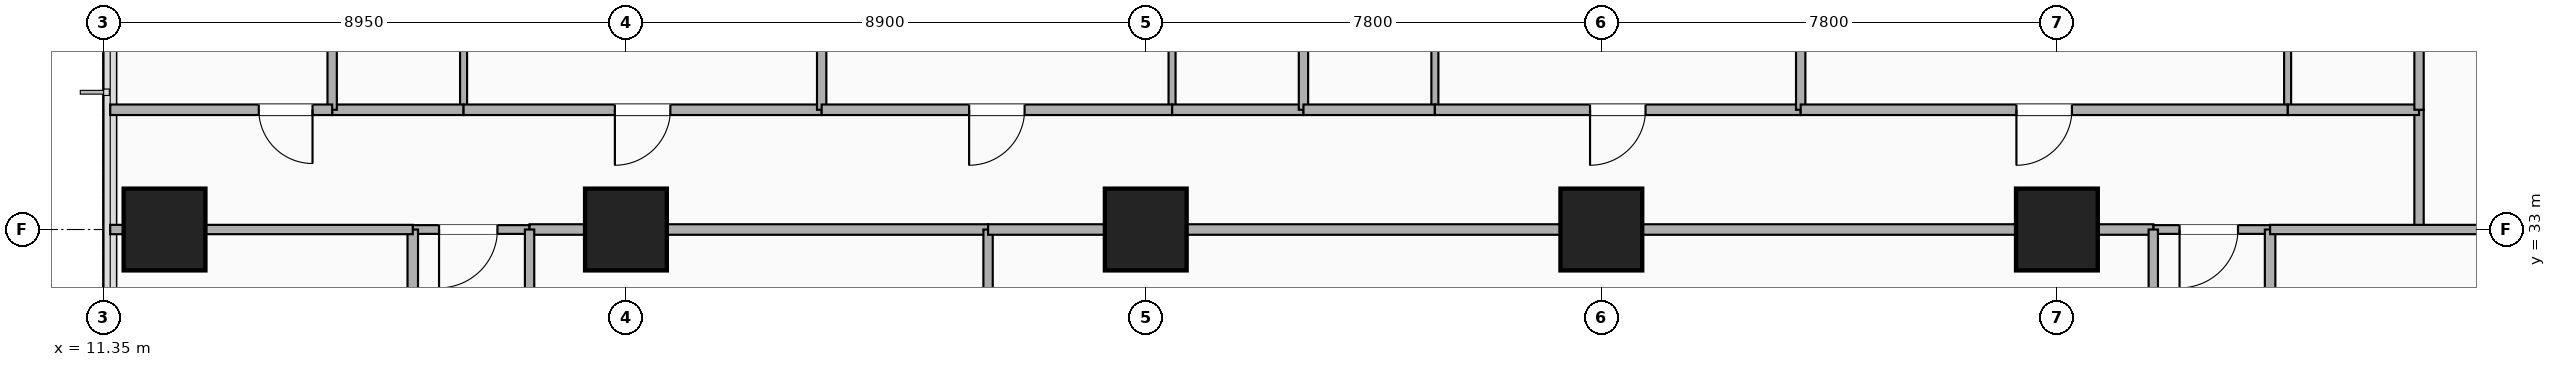
"""IFC4 building model, lengths in metres.
Left out: names, types, materials, properties, quantities, classifications, styles, units other than length and angle.
Written with IfcOpenShell. Run it as: python <this file> out.ifc"""

import sys

from ifc_helpers import new_model, si_unit, direction, frame, frame_2d, origin, origin_2d, place, context, subcontext, project, spatial, rectangle, extrude, element, fill, save


model = new_model("IFC4")
c1 = context("Model", 3, precision=1e-05, world=origin(), true_north=direction((0.0, 1.0)))
c2 = subcontext(c1, "Body", "Model", "MODEL_VIEW")
j1 = project(units=[si_unit("LENGTHUNIT", "METRE"), si_unit("PLANEANGLEUNIT", "RADIAN")], contexts=[c1])
p1 = place(None, origin())
s1 = spatial("IfcSite", under=j1, at=p1, CompositionType="ELEMENT")
p2 = place(p1, origin())
s2 = spatial("IfcBuilding", under=s1, at=p2, CompositionType="ELEMENT")
p3 = place(p2, frame((0.0, 0.0, 71.9)))
s3 = spatial("IfcBuildingStorey", under=s2, at=p3, CompositionType="ELEMENT", Elevation=71.9)
for number, where, z_axis, x_axis in (
    (1, (20.3, 33.0, -0.28), (0.0, 0.0, 1.0), (1.0, 0.0, 0.0)),
    (2, (29.2, 33.0, -0.28), (0.0, 0.0, 1.0), (1.0, 0.0, 0.0)),
    (3, (37.0, 33.0, -0.28), (0.0, 0.0, 1.0), (1.0, 0.0, 0.0)),
    (4, (44.8, 33.0, -0.28), (0.0, 0.0, 1.0), (1.0, 0.0, 0.0)),
    (5, (12.4, 33.0, -0.28), (0.0, 0.0, 1.0), (1.0, 0.0, 0.0)),
):
    element("IfcColumn", number, at=place(p3, frame(where, z_axis=z_axis, x_axis=x_axis)), inside=s3, PredefinedType="COLUMN", context=c2, shape_type="SweptSolid", body=[
        extrude(rectangle(XDim=1.4, YDim=1.4, at=origin_2d()), origin(), (0.0, 0.0, 1.0), 3.46),
    ])
p4 = place(p3, frame((16.65, 33.0, 0.0), z_axis=(0.0, 0.0, 1.0), x_axis=(1.0, 0.0, 0.0)))
e6 = element("IfcWall", 6, at=p4, inside=s3, PredefinedType="PARTITIONING", context=c2, shape_type="SweptSolid", body=[
    extrude(rectangle(XDim=2.0, YDim=0.15, at=frame_2d((1.0, 0.0))), origin(), (0.0, 0.0, 1.0), 2.47),
])
p5 = place(p4, frame((0.45, 0.0, 0.0)))
e7 = element("IfcOpeningElement", 7, at=p5, cuts=e6, PredefinedType="OPENING", context=c2, shape_type="SweptSolid", body=[
    extrude(rectangle(XDim=1.0, YDim=2.15, at=frame_2d((0.5, 1.075))), frame((0.0, 0.085, 0.0), z_axis=(0.0, -1.0, 0.0), x_axis=(1.0, 0.0, 0.0)), (0.0, 0.0, 1.0), 0.17),
])
p6 = place(p3, frame((46.45, 33.0, 0.0), z_axis=(0.0, 0.0, 1.0), x_axis=(1.0, 0.0, 0.0)))
e8 = element("IfcWall", 8, at=p6, inside=s3, PredefinedType="PARTITIONING", context=c2, shape_type="SweptSolid", body=[
    extrude(rectangle(XDim=2.0, YDim=0.15, at=frame_2d((1.0, 0.0))), origin(), (0.0, 0.0, 1.0), 2.47),
])
p7 = place(p6, frame((0.45, 0.0, 0.0)))
e9 = element("IfcOpeningElement", 9, at=p7, cuts=e8, PredefinedType="OPENING", context=c2, shape_type="SweptSolid", body=[
    extrude(rectangle(XDim=1.0, YDim=2.15, at=frame_2d((0.5, 1.075))), frame((0.0, 0.085, 0.0), z_axis=(0.0, -1.0, 0.0), x_axis=(1.0, 0.0, 0.0)), (0.0, 0.0, 1.0), 0.17),
])
p8 = place(p3, frame((51.0, 33.0, 0.0), z_axis=(0.0, 0.0, 1.0), x_axis=(0.0, 1.0, 0.0)))
e10 = element("IfcWall", 10, at=p8, inside=s3, PredefinedType="PARTITIONING", context=c2, shape_type="SweptSolid", body=[
    extrude(rectangle(XDim=2.05, YDim=0.16, at=frame_2d((1.025, 0.0))), origin(), (0.0, 0.0, 1.0), 2.47),
])
p9 = place(p3, frame((18.65, 33.0, 0.0), z_axis=(0.0, 0.0, 1.0), x_axis=(1.0, 0.0, 0.0)))
e11 = element("IfcWall", 11, at=p9, inside=s3, PredefinedType="PARTITIONING", context=c2, shape_type="SweptSolid", body=[
    extrude(rectangle(XDim=7.85, YDim=0.18, at=frame_2d((3.925, 0.0))), origin(), (0.0, 0.0, 1.0), 2.47),
])
for number, where, z_axis, x_axis in (
    (12, (18.65, 22.65, 0.0), (0.0, 0.0, 1.0), (0.0, 1.0, 0.0)),
    (13, (26.5, 22.65, 0.0), (0.0, 0.0, 1.0), (0.0, 1.0, 0.0)),
):
    element("IfcWall", number, at=place(p3, frame(where, z_axis=z_axis, x_axis=x_axis)), inside=s3, PredefinedType="PARTITIONING", context=c2, shape_type="SweptSolid", body=[
        extrude(rectangle(XDim=10.35, YDim=0.16, at=frame_2d((5.175, 0.0))), origin(), (0.0, 0.0, 1.0), 2.47),
    ])
p10 = place(p3, frame((26.5, 33.0, 0.0), z_axis=(0.0, 0.0, 1.0), x_axis=(1.0, 0.0, 0.0)))
e14 = element("IfcWall", 14, at=p10, inside=s3, PredefinedType="PARTITIONING", context=c2, shape_type="SweptSolid", body=[
    extrude(rectangle(XDim=19.95, YDim=0.18, at=frame_2d((9.975, 0.0))), origin(), (0.0, 0.0, 1.0), 2.47),
])
p11 = place(p3, frame((46.45, 22.65, 0.0), z_axis=(0.0, 0.0, 1.0), x_axis=(0.0, 1.0, 0.0)))
e15 = element("IfcWall", 15, at=p11, inside=s3, PredefinedType="PARTITIONING", context=c2, shape_type="SweptSolid", body=[
    extrude(rectangle(XDim=10.35, YDim=0.16, at=frame_2d((5.175, 0.0))), origin(), (0.0, 0.0, 1.0), 2.47),
])
p12 = place(p3, frame((17.52, 35.05, 0.0), z_axis=(0.0, 0.0, 1.0), x_axis=(0.0, 1.0, 0.0)))
e16 = element("IfcWall", 16, at=p12, inside=s3, PredefinedType="PARTITIONING", context=c2, shape_type="SweptSolid", body=[
    extrude(rectangle(XDim=2.35, YDim=0.12, at=frame_2d((1.175, 0.0))), origin(), (0.0, 0.0, 1.0), 3.18),
])
p13 = place(p3, frame((15.27, 35.05, 0.0), z_axis=(0.0, 0.0, 1.0), x_axis=(1.0, 0.0, 0.0)))
e17 = element("IfcWall", 17, at=p13, inside=s3, PredefinedType="PARTITIONING", context=c2, shape_type="SweptSolid", body=[
    extrude(rectangle(XDim=2.25, YDim=0.18, at=frame_2d((1.125, 0.0))), origin(), (0.0, 0.0, 1.0), 3.18),
])
p14 = place(p3, frame((17.52, 35.05, 0.0), z_axis=(0.0, 0.0, 1.0), x_axis=(1.0, 0.0, 0.0)))
e18 = element("IfcWall", 18, at=p14, inside=s3, PredefinedType="PARTITIONING", context=c2, shape_type="SweptSolid", body=[
    extrude(rectangle(XDim=6.131, YDim=0.18, at=frame_2d((3.065, 0.0))), origin(), (0.0, 0.0, 1.0), 2.47),
])
p15 = place(p14, frame((2.591, 0.0, 0.0)))
e19 = element("IfcOpeningElement", 19, at=p15, cuts=e18, PredefinedType="OPENING", context=c2, shape_type="SweptSolid", body=[
    extrude(rectangle(XDim=0.95, YDim=2.15, at=frame_2d((0.475, 1.075))), frame((0.0, 0.1, 0.0), z_axis=(0.0, -1.0, 0.0), x_axis=(1.0, 0.0, 0.0)), (0.0, 0.0, 1.0), 0.2),
])
p16 = place(p3, frame((15.27, 35.05, 0.0), z_axis=(0.0, 0.0, 1.0), x_axis=(0.0, 1.0, 0.0)))
e20 = element("IfcWall", 20, at=p16, inside=s3, PredefinedType="PARTITIONING", context=c2, shape_type="SweptSolid", body=[
    extrude(rectangle(XDim=9.53, YDim=0.16, at=frame_2d((4.765, 0.0))), origin(), (0.0, 0.0, 1.0), 3.18),
])
p17 = place(p3, frame((23.651, 35.05, 0.0), z_axis=(0.0, 0.0, 1.0), x_axis=(0.0, 1.0, 0.0)))
e21 = element("IfcWall", 21, at=p17, inside=s3, PredefinedType="PARTITIONING", context=c2, shape_type="SweptSolid", body=[
    extrude(rectangle(XDim=13.33, YDim=0.16, at=frame_2d((6.665, 0.0))), origin(), (0.0, 0.0, 1.0), 2.543),
])
p18 = place(p3, frame((29.65, 35.05, 0.0), z_axis=(0.0, 0.0, 1.0), x_axis=(0.0, 1.0, 0.0)))
e22 = element("IfcWall", 22, at=p18, inside=s3, PredefinedType="PARTITIONING", context=c2, shape_type="SweptSolid", body=[
    extrude(rectangle(XDim=2.35, YDim=0.12, at=frame_2d((1.175, 0.0))), origin(), (0.0, 0.0, 1.0), 2.862),
])
p19 = place(p3, frame((29.65, 35.05, 0.0), z_axis=(0.0, 0.0, 1.0), x_axis=(1.0, 0.0, 0.0)))
e23 = element("IfcWall", 23, at=p19, inside=s3, PredefinedType="PARTITIONING", context=c2, shape_type="SweptSolid", body=[
    extrude(rectangle(XDim=2.25, YDim=0.18, at=frame_2d((1.125, 0.0))), origin(), (0.0, 0.0, 1.0), 3.18),
])
p20 = place(p3, frame((23.651, 35.05, 0.0), z_axis=(0.0, 0.0, 1.0), x_axis=(1.0, 0.0, 0.0)))
e24 = element("IfcWall", 24, at=p20, inside=s3, PredefinedType="PARTITIONING", context=c2, shape_type="SweptSolid", body=[
    extrude(rectangle(XDim=5.999, YDim=0.18, at=frame_2d((3.0, 0.0))), origin(), (0.0, 0.0, 1.0), 2.47),
])
p21 = place(p20, frame((2.524, 0.0, 0.0)))
e25 = element("IfcOpeningElement", 25, at=p21, cuts=e24, PredefinedType="OPENING", context=c2, shape_type="SweptSolid", body=[
    extrude(rectangle(XDim=0.95, YDim=2.15, at=frame_2d((0.475, 1.075))), frame((0.0, 0.1, 0.0), z_axis=(0.0, -1.0, 0.0), x_axis=(1.0, 0.0, 0.0)), (0.0, 0.0, 1.0), 0.2),
])
p22 = place(p3, frame((31.9, 35.05, 0.0), z_axis=(0.0, 0.0, 1.0), x_axis=(0.0, 1.0, 0.0)))
e26 = element("IfcWall", 26, at=p22, inside=s3, PredefinedType="PARTITIONING", context=c2, shape_type="SweptSolid", body=[
    extrude(rectangle(XDim=13.33, YDim=0.16, at=frame_2d((6.665, 0.0))), origin(), (0.0, 0.0, 1.0), 2.543),
])
p23 = place(p3, frame((34.15, 35.05, 0.0), z_axis=(0.0, 0.0, 1.0), x_axis=(0.0, 1.0, 0.0)))
e27 = element("IfcWall", 27, at=p23, inside=s3, PredefinedType="PARTITIONING", context=c2, shape_type="SweptSolid", body=[
    extrude(rectangle(XDim=2.35, YDim=0.12, at=frame_2d((1.175, 0.0))), origin(), (0.0, 0.0, 1.0), 2.862),
])
p24 = place(p3, frame((31.9, 35.05, 0.0), z_axis=(0.0, 0.0, 1.0), x_axis=(1.0, 0.0, 0.0)))
e28 = element("IfcWall", 28, at=p24, inside=s3, PredefinedType="PARTITIONING", context=c2, shape_type="SweptSolid", body=[
    extrude(rectangle(XDim=2.25, YDim=0.18, at=frame_2d((1.125, 0.0))), origin(), (0.0, 0.0, 1.0), 3.18),
])
p25 = place(p3, frame((34.15, 35.05, 0.0), z_axis=(0.0, 0.0, 1.0), x_axis=(1.0, 0.0, 0.0)))
e29 = element("IfcWall", 29, at=p25, inside=s3, PredefinedType="PARTITIONING", context=c2, shape_type="SweptSolid", body=[
    extrude(rectangle(XDim=6.263, YDim=0.18, at=frame_2d((3.132, 0.0))), origin(), (0.0, 0.0, 1.0), 2.47),
])
p26 = place(p25, frame((2.657, 0.0, 0.0)))
e30 = element("IfcOpeningElement", 30, at=p26, cuts=e29, PredefinedType="OPENING", context=c2, shape_type="SweptSolid", body=[
    extrude(rectangle(XDim=0.95, YDim=2.15, at=frame_2d((0.475, 1.075))), frame((0.0, 0.1, 0.0), z_axis=(0.0, -1.0, 0.0), x_axis=(1.0, 0.0, 0.0)), (0.0, 0.0, 1.0), 0.2),
])
p27 = place(p3, frame((40.413, 35.05, 0.0), z_axis=(0.0, 0.0, 1.0), x_axis=(0.0, 1.0, 0.0)))
e31 = element("IfcWall", 31, at=p27, inside=s3, PredefinedType="PARTITIONING", context=c2, shape_type="SweptSolid", body=[
    extrude(rectangle(XDim=13.33, YDim=0.16, at=frame_2d((6.665, 0.0))), origin(), (0.0, 0.0, 1.0), 2.543),
])
p28 = place(p3, frame((48.75, 35.05, 0.0), z_axis=(0.0, 0.0, 1.0), x_axis=(0.0, 1.0, 0.0)))
e32 = element("IfcWall", 32, at=p28, inside=s3, PredefinedType="PARTITIONING", context=c2, shape_type="SweptSolid", body=[
    extrude(rectangle(XDim=2.35, YDim=0.12, at=frame_2d((1.175, 0.0))), origin(), (0.0, 0.0, 1.0), 3.18),
])
p29 = place(p3, frame((48.75, 35.05, 0.0), z_axis=(0.0, 0.0, 1.0), x_axis=(1.0, 0.0, 0.0)))
e33 = element("IfcWall", 33, at=p29, inside=s3, PredefinedType="PARTITIONING", context=c2, shape_type="SweptSolid", body=[
    extrude(rectangle(XDim=2.25, YDim=0.18, at=frame_2d((1.125, 0.0))), origin(), (0.0, 0.0, 1.0), 3.18),
])
p30 = place(p3, frame((40.413, 35.05, 0.0), z_axis=(0.0, 0.0, 1.0), x_axis=(1.0, 0.0, 0.0)))
e34 = element("IfcWall", 34, at=p30, inside=s3, PredefinedType="PARTITIONING", context=c2, shape_type="SweptSolid", body=[
    extrude(rectangle(XDim=8.337, YDim=0.18, at=frame_2d((4.168, 0.0))), origin(), (0.0, 0.0, 1.0), 2.47),
])
p31 = place(p30, frame((3.693, 0.0, 0.0)))
e35 = element("IfcOpeningElement", 35, at=p31, cuts=e34, PredefinedType="OPENING", context=c2, shape_type="SweptSolid", body=[
    extrude(rectangle(XDim=0.95, YDim=2.15, at=frame_2d((0.475, 1.075))), frame((0.0, 0.1, 0.0), z_axis=(0.0, -1.0, 0.0), x_axis=(1.0, 0.0, 0.0)), (0.0, 0.0, 1.0), 0.2),
])
p32 = place(p3, frame((51.0, 35.05, 0.0), z_axis=(0.0, 0.0, 1.0), x_axis=(0.0, 1.0, 0.0)))
e36 = element("IfcWall", 36, at=p32, inside=s3, PredefinedType="PARTITIONING", context=c2, shape_type="SweptSolid", body=[
    extrude(rectangle(XDim=13.33, YDim=0.16, at=frame_2d((6.665, 0.0))), origin(), (0.0, 0.0, 1.0), 3.18),
])
p33 = place(p3, frame((16.65, 28.183, 0.0), z_axis=(0.0, 0.0, 1.0), x_axis=(0.0, 1.0, 0.0)))
e37 = element("IfcWall", 37, at=p33, inside=s3, PredefinedType="PARTITIONING", context=c2, shape_type="SweptSolid", body=[
    extrude(rectangle(XDim=4.817, YDim=0.18, at=frame_2d((2.408, 0.0))), origin(), (0.0, 0.0, 1.0), 2.47),
])
p34 = place(p33, frame((1.933, 0.0, 0.0)))
e38 = element("IfcOpeningElement", 38, at=p34, cuts=e37, PredefinedType="OPENING", context=c2, shape_type="SweptSolid", body=[
    extrude(rectangle(XDim=0.95, YDim=2.15, at=frame_2d((0.475, 1.075))), frame((0.0, 0.1, 0.0), z_axis=(0.0, -1.0, 0.0), x_axis=(1.0, 0.0, 0.0)), (0.0, 0.0, 1.0), 0.2),
])
p35 = place(p3, frame((11.47, 33.0, 0.0), z_axis=(0.0, 0.0, 1.0), x_axis=(1.0, 0.0, 0.0)))
e39 = element("IfcWall", 39, at=p35, inside=s3, PredefinedType="PARTITIONING", context=c2, shape_type="SweptSolid", body=[
    extrude(rectangle(XDim=5.18, YDim=0.16, at=frame_2d((2.59, 0.0))), origin(), (0.0, 0.0, 1.0), 2.47),
])
p36 = place(p3, frame((48.45, 28.55, 0.0), z_axis=(0.0, 0.0, 1.0), x_axis=(0.0, 1.0, 0.0)))
e40 = element("IfcWall", 40, at=p36, inside=s3, PredefinedType="PARTITIONING", context=c2, shape_type="SweptSolid", body=[
    extrude(rectangle(XDim=4.45, YDim=0.18, at=frame_2d((2.225, 0.0))), origin(), (0.0, 0.0, 1.0), 2.47),
])
p37 = place(p36, frame((2.7, 0.0, 0.0), z_axis=(0.0, 0.0, 1.0), x_axis=(-1.0, 0.0, 0.0)))
e41 = element("IfcOpeningElement", 41, at=p37, cuts=e40, PredefinedType="OPENING", context=c2, shape_type="SweptSolid", body=[
    extrude(rectangle(XDim=0.95, YDim=2.15, at=frame_2d((0.475, 1.075))), frame((0.0, 0.1, 0.0), z_axis=(0.0, -1.0, 0.0), x_axis=(1.0, 0.0, 0.0)), (0.0, 0.0, 1.0), 0.2),
])
p38 = place(p3, frame((48.45, 33.0, 0.0), z_axis=(0.0, 0.0, 1.0), x_axis=(1.0, 0.0, 0.0)))
e42 = element("IfcWall", 42, at=p38, inside=s3, PredefinedType="PARTITIONING", context=c2, shape_type="SweptSolid", body=[
    extrude(rectangle(XDim=13.23, YDim=0.16, at=frame_2d((6.615, 0.0))), origin(), (0.0, 0.0, 1.0), 2.47),
])
p39 = place(p3, frame((11.47, 35.05, 0.0), z_axis=(0.0, 0.0, 1.0), x_axis=(1.0, 0.0, 0.0)))
e43 = element("IfcWall", 43, at=p39, inside=s3, PredefinedType="PARTITIONING", context=c2, shape_type="SweptSolid", body=[
    extrude(rectangle(XDim=3.8, YDim=0.18, at=frame_2d((1.9, 0.0))), origin(), (0.0, 0.0, 1.0), 3.18),
])
p40 = place(p39, frame((2.544, 0.0, 0.0)))
e44 = element("IfcOpeningElement", 44, at=p40, cuts=e43, PredefinedType="OPENING", context=c2, shape_type="SweptSolid", body=[
    extrude(rectangle(XDim=0.92, YDim=2.08, at=frame_2d((0.46, 1.04))), frame((0.0, 0.1, 0.0), z_axis=(0.0, -1.0, 0.0), x_axis=(1.0, 0.0, 0.0)), (0.0, 0.0, 1.0), 0.2),
])
p41 = place(p5, origin())
e45 = element("IfcDoor", 45, at=p41, inside=s3, OperationType="SINGLE_SWING_LEFT", PredefinedType="DOOR", context=c2, shape_type="SweptSolid", body=[
    extrude(rectangle(XDim=1.0, YDim=2.15, at=frame_2d((0.5, 1.075))), frame((0.0, 0.025, 0.0), z_axis=(0.0, -1.0, 0.0), x_axis=(1.0, 0.0, 0.0)), (0.0, 0.0, 1.0), 0.05),
])
fill(e7, e45)
p42 = place(p7, origin())
e46 = element("IfcDoor", 46, at=p42, inside=s3, OperationType="SINGLE_SWING_LEFT", PredefinedType="DOOR", context=c2, shape_type="SweptSolid", body=[
    extrude(rectangle(XDim=1.0, YDim=2.15, at=frame_2d((0.5, 1.075))), frame((0.0, 0.025, 0.0), z_axis=(0.0, -1.0, 0.0), x_axis=(1.0, 0.0, 0.0)), (0.0, 0.0, 1.0), 0.05),
])
fill(e9, e46)
p43 = place(p15, origin())
e47 = element("IfcDoor", 47, at=p43, inside=s3, OperationType="SINGLE_SWING_LEFT", PredefinedType="DOOR", context=c2, shape_type="SweptSolid", body=[
    extrude(rectangle(XDim=0.95, YDim=2.15, at=frame_2d((0.475, 1.075))), frame((0.0, 0.025, 0.0), z_axis=(0.0, -1.0, 0.0), x_axis=(1.0, 0.0, 0.0)), (0.0, 0.0, 1.0), 0.05),
])
fill(e19, e47)
p44 = place(p21, origin())
e48 = element("IfcDoor", 48, at=p44, inside=s3, OperationType="SINGLE_SWING_LEFT", PredefinedType="DOOR", context=c2, shape_type="SweptSolid", body=[
    extrude(rectangle(XDim=0.95, YDim=2.15, at=frame_2d((0.475, 1.075))), frame((0.0, 0.025, 0.0), z_axis=(0.0, -1.0, 0.0), x_axis=(1.0, 0.0, 0.0)), (0.0, 0.0, 1.0), 0.05),
])
fill(e25, e48)
p45 = place(p26, origin())
e49 = element("IfcDoor", 49, at=p45, inside=s3, OperationType="SINGLE_SWING_LEFT", PredefinedType="DOOR", context=c2, shape_type="SweptSolid", body=[
    extrude(rectangle(XDim=0.95, YDim=2.15, at=frame_2d((0.475, 1.075))), frame((0.0, 0.025, 0.0), z_axis=(0.0, -1.0, 0.0), x_axis=(1.0, 0.0, 0.0)), (0.0, 0.0, 1.0), 0.05),
])
fill(e30, e49)
p46 = place(p31, origin())
e50 = element("IfcDoor", 50, at=p46, inside=s3, OperationType="SINGLE_SWING_LEFT", PredefinedType="DOOR", context=c2, shape_type="SweptSolid", body=[
    extrude(rectangle(XDim=0.95, YDim=2.15, at=frame_2d((0.475, 1.075))), frame((0.0, 0.025, 0.0), z_axis=(0.0, -1.0, 0.0), x_axis=(1.0, 0.0, 0.0)), (0.0, 0.0, 1.0), 0.05),
])
fill(e35, e50)
p47 = place(p40, origin())
e51 = element("IfcDoor", 51, at=p47, inside=s3, OperationType="SINGLE_SWING_RIGHT", PredefinedType="DOOR", context=c2, shape_type="SweptSolid", body=[
    extrude(rectangle(XDim=0.92, YDim=2.08, at=frame_2d((0.46, 1.04))), frame((0.0, 0.025, 0.0), z_axis=(0.0, -1.0, 0.0), x_axis=(1.0, 0.0, 0.0)), (0.0, 0.0, 1.0), 0.05),
])
fill(e44, e51)
save(model, sys.argv[1])
